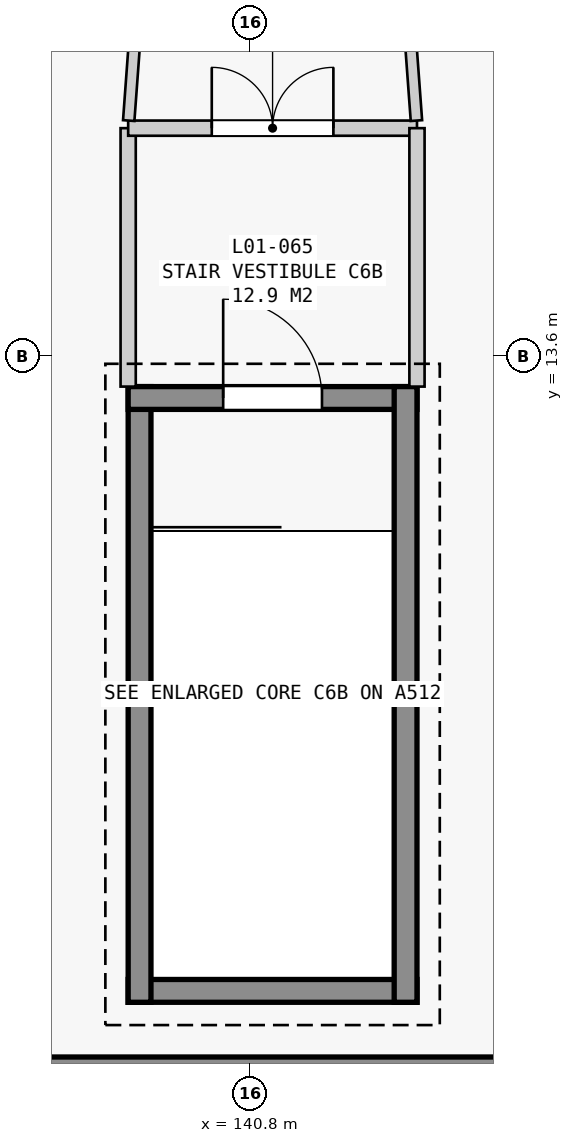
"""IFC4 building model, lengths in metres.
Left out: names, types, materials, properties, quantities, classifications, styles, units other than length and angle.
Written with IfcOpenShell. Run it as: python <this file> out.ifc"""

import sys

from ifc_helpers import new_model, si_unit, direction, frame, frame_2d, origin, place, context, subcontext, project, spatial, rectangle, extrude, element, fill, save


model = new_model("IFC4")
c1 = context("Model", 3, precision=1e-05, world=origin(), true_north=direction((0.0, 1.0)))
c2 = subcontext(c1, "Body", "Model", "MODEL_VIEW")
j1 = project(units=[si_unit("LENGTHUNIT", "METRE"), si_unit("PLANEANGLEUNIT", "RADIAN")], contexts=[c1])
p1 = place(None, origin())
s1 = spatial("IfcSite", under=j1, at=p1, CompositionType="ELEMENT")
p2 = place(p1, origin())
s2 = spatial("IfcBuilding", under=s1, at=p2, CompositionType="ELEMENT")
p3 = place(p2, frame((0.0, 0.0, 5.4)))
s3 = spatial("IfcBuildingStorey", under=s2, at=p3, CompositionType="ELEMENT", Elevation=5.4)
p4 = place(p3, frame((145.41, 4.19, 0.0), z_axis=(0.0, 0.0, 1.0), x_axis=(-1.0, 0.0, 0.0)))
e1 = element("IfcWall", 1, at=p4, inside=s3, PredefinedType="STANDARD", context=c2, shape_type="SweptSolid", body=[
    extrude(rectangle(XDim=33.12, YDim=0.38, at=frame_2d((16.56, 0.0))), origin(), (0.0, 0.0, 1.0), 3.94),
])
p5 = place(p3, frame((143.0, 5.25, 0.0), z_axis=(0.0, 0.0, 1.0), x_axis=(-1.0, 0.0, 0.0)))
e2 = element("IfcWall", 2, at=p5, inside=s3, PredefinedType="SHEAR", context=c2, shape_type="SweptSolid", body=[
    extrude(rectangle(XDim=3.8, YDim=0.3, at=frame_2d((1.9, 0.0))), origin(), (0.0, 0.0, 1.0), 4.2),
])
p6 = place(p3, frame((139.35, 5.1, 0.0), z_axis=(0.0, 0.0, 1.0), x_axis=(0.0, 1.0, 0.0)))
e3 = element("IfcWall", 3, at=p6, inside=s3, PredefinedType="SHEAR", context=c2, shape_type="SweptSolid", body=[
    extrude(rectangle(XDim=8.1, YDim=0.3, at=frame_2d((4.05, 0.0))), origin(), (0.0, 0.0, 1.0), 4.2),
])
p7 = place(p3, frame((139.2, 13.05, 0.0), z_axis=(0.0, 0.0, 1.0), x_axis=(1.0, 0.0, 0.0)))
e4 = element("IfcWall", 4, at=p7, inside=s3, PredefinedType="SHEAR", context=c2, shape_type="SweptSolid", body=[
    extrude(rectangle(XDim=3.8, YDim=0.3, at=frame_2d((1.9, 0.0))), origin(), (0.0, 0.0, 1.0), 4.2),
])
p8 = place(p7, frame((1.25, 0.0, 0.0)))
e5 = element("IfcOpeningElement", 5, at=p8, cuts=e4, PredefinedType="OPENING", context=c2, shape_type="SweptSolid", body=[
    extrude(rectangle(XDim=1.3, YDim=2.2, at=frame_2d((0.65, 1.1))), frame((0.0, 0.16, 0.0), z_axis=(0.0, -1.0, 0.0), x_axis=(1.0, 0.0, 0.0)), (0.0, 0.0, 1.0), 0.32),
])
p9 = place(p3, frame((142.85, 13.2, 0.0), z_axis=(0.0, 0.0, 1.0), x_axis=(0.0, -1.0, 0.0)))
e6 = element("IfcWall", 6, at=p9, inside=s3, PredefinedType="SHEAR", context=c2, shape_type="SweptSolid", body=[
    extrude(rectangle(XDim=8.1, YDim=0.3, at=frame_2d((4.05, 0.0))), origin(), (0.0, 0.0, 1.0), 4.2),
])
p10 = place(p3, frame((139.2, 13.2, 0.0), z_axis=(0.0, 0.0, 1.0), x_axis=(0.0, 1.0, 0.0)))
e7 = element("IfcWall", 7, at=p10, inside=s3, PredefinedType="STANDARD", context=c2, shape_type="SweptSolid", body=[
    extrude(rectangle(XDim=3.4, YDim=0.2, at=frame_2d((1.7, 0.0))), origin(), (0.0, 0.0, 1.0), 3.12),
])
p11 = place(p3, frame((139.2, 16.6, 0.0), z_axis=(0.0, 0.0, 1.0), x_axis=(1.0, 0.0, 0.0)))
e8 = element("IfcWall", 8, at=p11, inside=s3, PredefinedType="STANDARD", context=c2, shape_type="SweptSolid", body=[
    extrude(rectangle(XDim=3.8, YDim=0.2, at=frame_2d((1.9, 0.0))), origin(), (0.0, 0.0, 1.0), 4.2),
])
p12 = place(p11, frame((1.1, 0.0, 0.0)))
e9 = element("IfcOpeningElement", 9, at=p12, cuts=e8, PredefinedType="OPENING", context=c2, shape_type="SweptSolid", body=[
    extrude(rectangle(XDim=1.6, YDim=2.2, at=frame_2d((0.8, 1.1))), frame((0.0, 0.11, 0.0), z_axis=(0.0, -1.0, 0.0), x_axis=(1.0, 0.0, 0.0)), (0.0, 0.0, 1.0), 0.22),
])
p13 = place(p3, frame((143.0, 16.6, 0.0), z_axis=(0.0, 0.0, 1.0), x_axis=(0.0, -1.0, 0.0)))
e10 = element("IfcWall", 10, at=p13, inside=s3, PredefinedType="STANDARD", context=c2, shape_type="SweptSolid", body=[
    extrude(rectangle(XDim=3.4, YDim=0.2, at=frame_2d((1.7, 0.0))), origin(), (0.0, 0.0, 1.0), 3.12),
])
for number, where, z_axis, x_axis in (
    (11, (139.42, 19.6, 0.0), (0.0, 0.0, 1.0), (-0.073, -0.997, 0.0)),
    (12, (142.993, 16.7, 0.0), (0.0, 0.0, 1.0), (-0.073, 0.997, 0.0)),
):
    element("IfcWall", number, at=place(p3, frame(where, z_axis=z_axis, x_axis=x_axis)), inside=s3, PredefinedType="PARTITIONING", context=c2, shape_type="SweptSolid", body=[
        extrude(rectangle(XDim=2.908, YDim=0.15, at=frame_2d((1.454, 0.0))), origin(), (0.0, 0.0, 1.0), 3.94),
    ])
p14 = place(p8, origin())
e13 = element("IfcDoor", 13, at=p14, inside=s3, OperationType="SINGLE_SWING_LEFT", PredefinedType="DOOR", context=c2, shape_type="SweptSolid", body=[
    extrude(rectangle(XDim=1.3, YDim=2.2, at=frame_2d((0.65, 1.1))), frame((0.0, 0.025, 0.0), z_axis=(0.0, -1.0, 0.0), x_axis=(1.0, 0.0, 0.0)), (0.0, 0.0, 1.0), 0.05),
])
fill(e5, e13)
p15 = place(p12, origin())
e14 = element("IfcDoor", 14, at=p15, inside=s3, OperationType="DOUBLE_DOOR_SINGLE_SWING", PredefinedType="DOOR", context=c2, shape_type="SweptSolid", body=[
    extrude(rectangle(XDim=1.6, YDim=2.2, at=frame_2d((0.8, 1.1))), frame((0.0, 0.025, 0.0), z_axis=(0.0, -1.0, 0.0), x_axis=(1.0, 0.0, 0.0)), (0.0, 0.0, 1.0), 0.05),
])
fill(e9, e14)
save(model, sys.argv[1])
